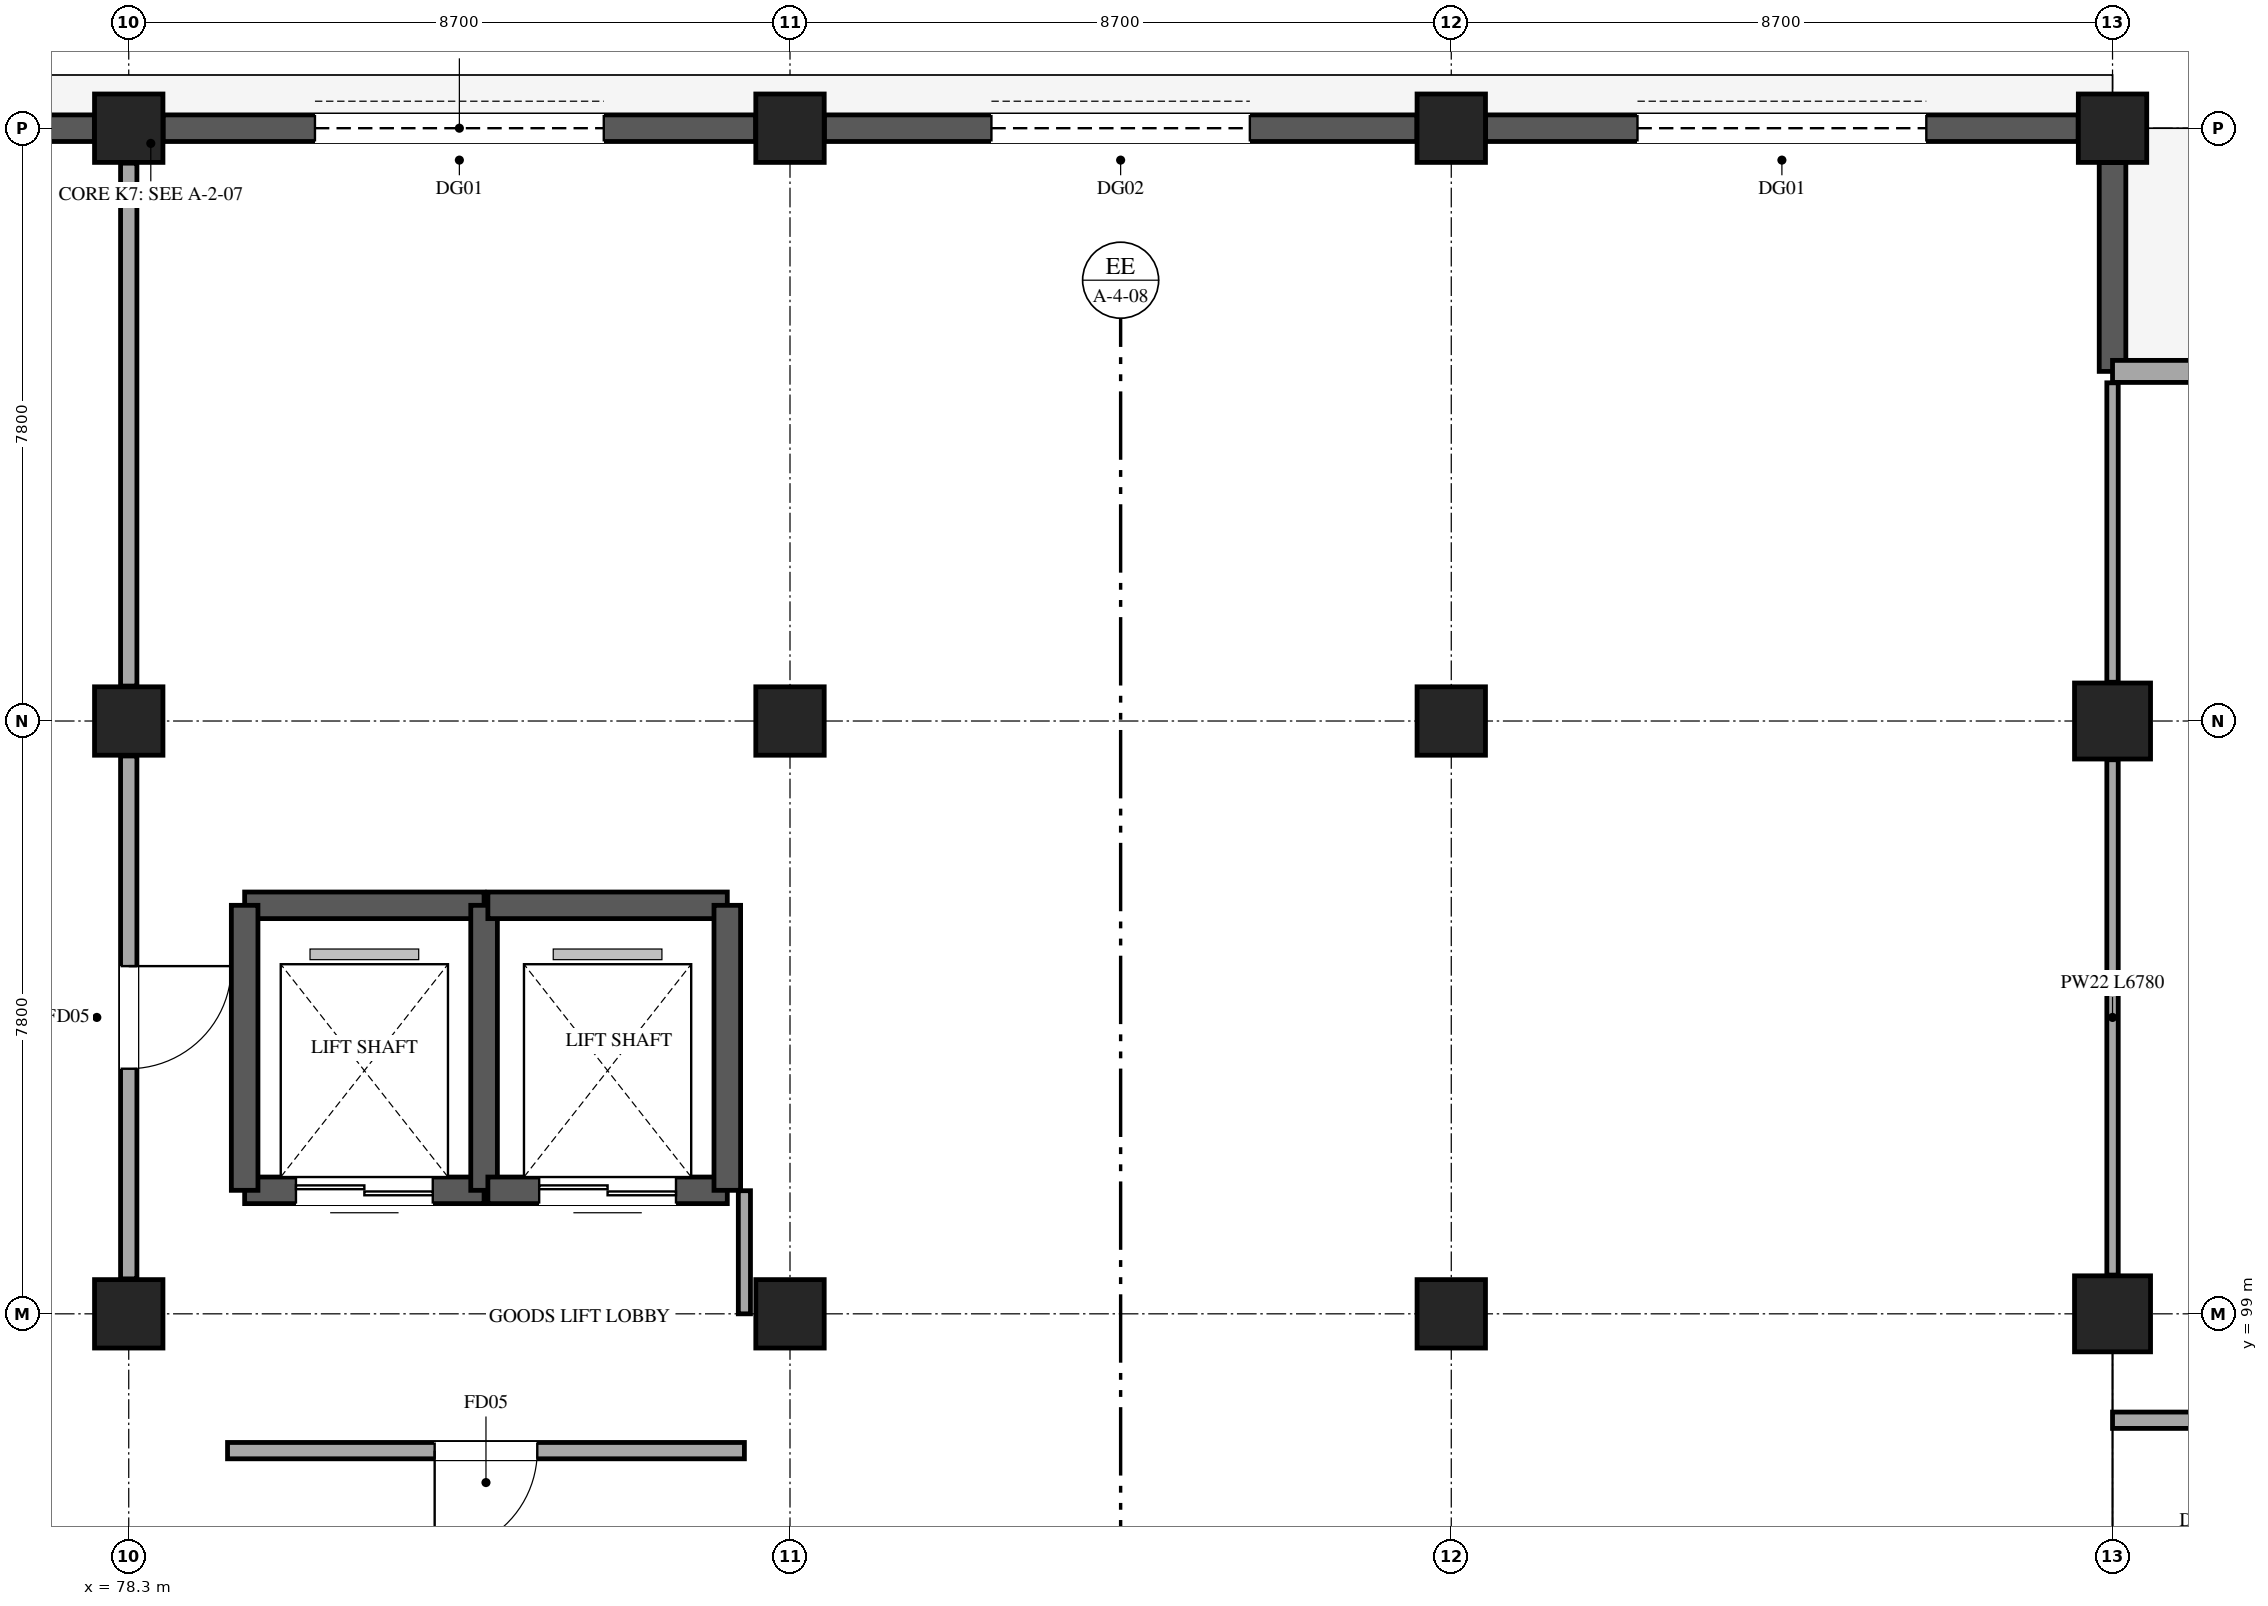
"""IFC4 building model, lengths in metres.
Left out: names, types, materials, properties, quantities, classifications, styles, units other than length and angle.
Written with IfcOpenShell. Run it as: python <this file> out.ifc"""

import sys

from ifc_helpers import new_model, si_unit, direction, frame, frame_2d, origin, origin_2d, place, context, subcontext, project, spatial, rectangle, extrude, element, fill, save


model = new_model("IFC4")
c1 = context("Model", 3, precision=1e-05, world=origin(), true_north=direction((0.0, 1.0)))
c2 = subcontext(c1, "Body", "Model", "MODEL_VIEW")
j1 = project(units=[si_unit("LENGTHUNIT", "METRE"), si_unit("PLANEANGLEUNIT", "RADIAN")], contexts=[c1])
p1 = place(None, origin())
s1 = spatial("IfcSite", under=j1, at=p1, CompositionType="ELEMENT")
p2 = place(p1, origin())
s2 = spatial("IfcBuilding", under=s1, at=p2, CompositionType="ELEMENT")
p3 = place(p2, origin())
s3 = spatial("IfcBuildingStorey", under=s2, at=p3, CompositionType="ELEMENT", Elevation=0.0)
for number, where, z_axis, x_axis in (
    (1, (78.3, 99.0, 0.0), (0.0, 0.0, 1.0), (1.0, 0.0, 0.0)),
    (2, (78.3, 106.8, 0.0), (0.0, 0.0, 1.0), (1.0, 0.0, 0.0)),
    (3, (78.3, 114.6, 0.0), (0.0, 0.0, 1.0), (1.0, 0.0, 0.0)),
    (4, (87.0, 99.0, 0.0), (0.0, 0.0, 1.0), (1.0, 0.0, 0.0)),
    (5, (87.0, 106.8, 0.0), (0.0, 0.0, 1.0), (1.0, 0.0, 0.0)),
    (6, (87.0, 114.6, 0.0), (0.0, 0.0, 1.0), (1.0, 0.0, 0.0)),
    (7, (95.7, 99.0, 0.0), (0.0, 0.0, 1.0), (1.0, 0.0, 0.0)),
    (8, (95.7, 106.8, 0.0), (0.0, 0.0, 1.0), (1.0, 0.0, 0.0)),
    (9, (95.7, 114.6, 0.0), (0.0, 0.0, 1.0), (1.0, 0.0, 0.0)),
):
    element("IfcColumn", number, at=place(p3, frame(where, z_axis=z_axis, x_axis=x_axis)), inside=s3, PredefinedType="COLUMN", context=c2, shape_type="SweptSolid", body=[
        extrude(rectangle(XDim=0.9, YDim=0.9, at=origin_2d()), origin(), (0.0, 0.0, 1.0), 6.0),
    ])
for number, where, z_axis, x_axis in (
    (10, (104.4, 99.0, 0.0), (0.0, 0.0, 1.0), (1.0, 0.0, 0.0)),
    (11, (104.4, 106.8, 0.0), (0.0, 0.0, 1.0), (1.0, 0.0, 0.0)),
):
    element("IfcColumn", number, at=place(p3, frame(where, z_axis=z_axis, x_axis=x_axis)), inside=s3, PredefinedType="COLUMN", context=c2, shape_type="SweptSolid", body=[
        extrude(rectangle(XDim=1.0, YDim=1.0, at=origin_2d()), origin(), (0.0, 0.0, 1.0), 6.0),
    ])
p4 = place(p3, frame((104.4, 114.6, 0.0), z_axis=(0.0, 0.0, 1.0), x_axis=(1.0, 0.0, 0.0)))
e12 = element("IfcColumn", 12, at=p4, inside=s3, PredefinedType="COLUMN", context=c2, shape_type="SweptSolid", body=[
    extrude(rectangle(XDim=0.9, YDim=0.9, at=origin_2d()), origin(), (0.0, 0.0, 1.0), 6.0),
])
p5 = place(p3, frame((70.052, 114.6, 0.0), z_axis=(0.0, 0.0, 1.0), x_axis=(1.0, 0.0, 0.0)))
e13 = element("IfcWall", 13, at=p5, inside=s3, PredefinedType="STANDARD", context=c2, shape_type="SweptSolid", body=[
    extrude(rectangle(XDim=7.796, YDim=0.35, at=frame_2d((3.898, 0.0))), origin(), (0.0, 0.0, 1.0), 5.66),
])
p6 = place(p5, frame((1.543, 0.0, 0.0)))
e14 = element("IfcOpeningElement", 14, at=p6, cuts=e13, PredefinedType="OPENING", context=c2, shape_type="SweptSolid", body=[
    extrude(rectangle(XDim=3.2, YDim=2.4, at=frame_2d((1.6, 1.2))), frame((0.0, 0.185, 0.0), z_axis=(0.0, -1.0, 0.0), x_axis=(1.0, 0.0, 0.0)), (0.0, 0.0, 1.0), 0.37),
])
p7 = place(p3, frame((78.752, 114.6, 0.0), z_axis=(0.0, 0.0, 1.0), x_axis=(1.0, 0.0, 0.0)))
e15 = element("IfcWall", 15, at=p7, inside=s3, PredefinedType="STANDARD", context=c2, shape_type="SweptSolid", body=[
    extrude(rectangle(XDim=7.796, YDim=0.35, at=frame_2d((3.898, 0.0))), origin(), (0.0, 0.0, 1.0), 5.66),
])
p8 = place(p7, frame((1.998, 0.0, 0.0)))
e16 = element("IfcOpeningElement", 16, at=p8, cuts=e15, PredefinedType="OPENING", context=c2, shape_type="SweptSolid", body=[
    extrude(rectangle(XDim=3.8, YDim=4.0, at=frame_2d((1.9, 2.0))), frame((0.0, 0.185, 0.0), z_axis=(0.0, -1.0, 0.0), x_axis=(1.0, 0.0, 0.0)), (0.0, 0.0, 1.0), 0.37),
])
p9 = place(p3, frame((87.452, 114.6, 0.0), z_axis=(0.0, 0.0, 1.0), x_axis=(1.0, 0.0, 0.0)))
e17 = element("IfcWall", 17, at=p9, inside=s3, PredefinedType="STANDARD", context=c2, shape_type="SweptSolid", body=[
    extrude(rectangle(XDim=7.796, YDim=0.35, at=frame_2d((3.898, 0.0))), origin(), (0.0, 0.0, 1.0), 5.66),
])
p10 = place(p9, frame((2.198, 0.0, 0.0)))
e18 = element("IfcOpeningElement", 18, at=p10, cuts=e17, PredefinedType="OPENING", context=c2, shape_type="SweptSolid", body=[
    extrude(rectangle(XDim=3.4, YDim=3.8, at=frame_2d((1.7, 1.9))), frame((0.0, 0.185, 0.0), z_axis=(0.0, -1.0, 0.0), x_axis=(1.0, 0.0, 0.0)), (0.0, 0.0, 1.0), 0.37),
])
p11 = place(p3, frame((96.152, 114.6, 0.0), z_axis=(0.0, 0.0, 1.0), x_axis=(1.0, 0.0, 0.0)))
e19 = element("IfcWall", 19, at=p11, inside=s3, PredefinedType="STANDARD", context=c2, shape_type="SweptSolid", body=[
    extrude(rectangle(XDim=7.796, YDim=0.35, at=frame_2d((3.898, 0.0))), origin(), (0.0, 0.0, 1.0), 5.66),
])
p12 = place(p11, frame((1.998, 0.0, 0.0)))
e20 = element("IfcOpeningElement", 20, at=p12, cuts=e19, PredefinedType="OPENING", context=c2, shape_type="SweptSolid", body=[
    extrude(rectangle(XDim=3.8, YDim=4.0, at=frame_2d((1.9, 2.0))), frame((0.0, 0.185, 0.0), z_axis=(0.0, -1.0, 0.0), x_axis=(1.0, 0.0, 0.0)), (0.0, 0.0, 1.0), 0.37),
])
p13 = place(p3, frame((104.4, 114.148, 0.0), z_axis=(0.0, 0.0, 1.0), x_axis=(0.0, -1.0, 0.0)))
e21 = element("IfcWall", 21, at=p13, inside=s3, PredefinedType="STANDARD", context=c2, shape_type="SweptSolid", body=[
    extrude(rectangle(XDim=2.748, YDim=0.35, at=frame_2d((1.374, 0.0))), origin(), (0.0, 0.0, 1.0), 5.66),
])
p14 = place(p3, frame((104.4, 111.4, 0.0), z_axis=(0.0, 0.0, 1.0), x_axis=(1.0, 0.0, 0.0)))
e22 = element("IfcWall", 22, at=p14, inside=s3, PredefinedType="STANDARD", context=c2, shape_type="SweptSolid", body=[
    extrude(rectangle(XDim=6.665, YDim=0.29, at=frame_2d((3.333, 0.0))), origin(), (0.0, 0.0, 1.0), 4.875),
])
p15 = place(p14, frame((1.932, 0.0, 0.0)))
e23 = element("IfcOpeningElement", 23, at=p15, cuts=e22, PredefinedType="OPENING", context=c2, shape_type="SweptSolid", body=[
    extrude(rectangle(XDim=2.8, YDim=2.5, at=frame_2d((1.4, 1.25))), frame((0.0, 0.155, 0.0), z_axis=(0.0, -1.0, 0.0), x_axis=(1.0, 0.0, 0.0)), (0.0, 0.0, 1.0), 0.31),
])
p16 = place(p3, frame((79.825, 104.375, 0.0), z_axis=(0.0, 0.0, 1.0), x_axis=(1.0, 0.0, 0.0)))
e24 = element("IfcWall", 24, at=p16, inside=s3, PredefinedType="SHEAR", context=c2, shape_type="SweptSolid", body=[
    extrude(rectangle(XDim=3.15, YDim=0.35, at=frame_2d((1.575, 0.0))), origin(), (0.0, 0.0, 1.0), 6.0),
])
p17 = place(p3, frame((82.975, 100.625, 0.0), z_axis=(0.0, 0.0, 1.0), x_axis=(-1.0, 0.0, 0.0)))
e25 = element("IfcWall", 25, at=p17, inside=s3, PredefinedType="SHEAR", context=c2, shape_type="SweptSolid", body=[
    extrude(rectangle(XDim=3.15, YDim=0.35, at=frame_2d((1.575, 0.0))), origin(), (0.0, 0.0, 1.0), 6.0),
])
p18 = place(p17, frame((0.675, 0.0, 0.0)))
e26 = element("IfcOpeningElement", 26, at=p18, cuts=e25, PredefinedType="OPENING", context=c2, shape_type="SweptSolid", body=[
    extrude(rectangle(XDim=1.8, YDim=2.4, at=frame_2d((0.9, 1.2))), frame((0.0, 0.185, 0.0), z_axis=(0.0, -1.0, 0.0), x_axis=(1.0, 0.0, 0.0)), (0.0, 0.0, 1.0), 0.37),
])
for number, where, z_axis, x_axis in (
    (27, (79.825, 100.625, 0.0), (0.0, 0.0, 1.0), (0.0, 1.0, 0.0)),
    (28, (82.975, 104.375, 0.0), (0.0, 0.0, 1.0), (0.0, -1.0, 0.0)),
):
    element("IfcWall", number, at=place(p3, frame(where, z_axis=z_axis, x_axis=x_axis)), inside=s3, PredefinedType="SHEAR", context=c2, shape_type="SweptSolid", body=[
        extrude(rectangle(XDim=3.75, YDim=0.35, at=frame_2d((1.875, 0.0))), origin(), (0.0, 0.0, 1.0), 6.0),
    ])
p19 = place(p3, frame((83.025, 104.375, 0.0), z_axis=(0.0, 0.0, 1.0), x_axis=(1.0, 0.0, 0.0)))
e29 = element("IfcWall", 29, at=p19, inside=s3, PredefinedType="SHEAR", context=c2, shape_type="SweptSolid", body=[
    extrude(rectangle(XDim=3.15, YDim=0.35, at=frame_2d((1.575, 0.0))), origin(), (0.0, 0.0, 1.0), 6.0),
])
p20 = place(p3, frame((86.175, 100.625, 0.0), z_axis=(0.0, 0.0, 1.0), x_axis=(-1.0, 0.0, 0.0)))
e30 = element("IfcWall", 30, at=p20, inside=s3, PredefinedType="SHEAR", context=c2, shape_type="SweptSolid", body=[
    extrude(rectangle(XDim=3.15, YDim=0.35, at=frame_2d((1.575, 0.0))), origin(), (0.0, 0.0, 1.0), 6.0),
])
p21 = place(p20, frame((0.675, 0.0, 0.0)))
e31 = element("IfcOpeningElement", 31, at=p21, cuts=e30, PredefinedType="OPENING", context=c2, shape_type="SweptSolid", body=[
    extrude(rectangle(XDim=1.8, YDim=2.4, at=frame_2d((0.9, 1.2))), frame((0.0, 0.185, 0.0), z_axis=(0.0, -1.0, 0.0), x_axis=(1.0, 0.0, 0.0)), (0.0, 0.0, 1.0), 0.37),
])
p22 = place(p3, frame((86.175, 104.375, 0.0), z_axis=(0.0, 0.0, 1.0), x_axis=(0.0, -1.0, 0.0)))
e32 = element("IfcWall", 32, at=p22, inside=s3, PredefinedType="SHEAR", context=c2, shape_type="SweptSolid", body=[
    extrude(rectangle(XDim=3.75, YDim=0.35, at=frame_2d((1.875, 0.0))), origin(), (0.0, 0.0, 1.0), 6.0),
])
p23 = place(p3, frame((86.4, 97.2, 0.0), z_axis=(0.0, 0.0, 1.0), x_axis=(-1.0, 0.0, 0.0)))
e33 = element("IfcWall", 33, at=p23, inside=s3, PredefinedType="PARTITIONING", context=c2, shape_type="SweptSolid", body=[
    extrude(rectangle(XDim=6.8, YDim=0.215, at=frame_2d((3.4, 0.0))), origin(), (0.0, 0.0, 1.0), 5.66),
])
p24 = place(p23, frame((2.725, 0.0, 0.0)))
e34 = element("IfcOpeningElement", 34, at=p24, cuts=e33, PredefinedType="OPENING", context=c2, shape_type="SweptSolid", body=[
    extrude(rectangle(XDim=1.35, YDim=2.2, at=frame_2d((0.675, 1.1))), frame((0.0, 0.118, 0.0), z_axis=(0.0, -1.0, 0.0), x_axis=(1.0, 0.0, 0.0)), (0.0, 0.0, 1.0), 0.235),
])
p25 = place(p3, frame((86.4, 100.62, 0.0), z_axis=(0.0, 0.0, 1.0), x_axis=(0.0, -1.0, 0.0)))
e35 = element("IfcWall", 35, at=p25, inside=s3, PredefinedType="PARTITIONING", context=c2, shape_type="SweptSolid", body=[
    extrude(rectangle(XDim=1.62, YDim=0.16, at=frame_2d((0.81, 0.0))), origin(), (0.0, 0.0, 1.0), 4.88),
])
p26 = place(p3, frame((78.3, 114.14, 0.0), z_axis=(0.0, 0.0, 1.0), x_axis=(0.0, -1.0, 0.0)))
e36 = element("IfcWall", 36, at=p26, inside=s3, PredefinedType="PARTITIONING", context=c2, shape_type="SweptSolid", body=[
    extrude(rectangle(XDim=6.88, YDim=0.215, at=frame_2d((3.44, 0.0))), origin(), (0.0, 0.0, 1.0), 4.88),
])
p27 = place(p3, frame((78.3, 106.34, 0.0), z_axis=(0.0, 0.0, 1.0), x_axis=(0.0, -1.0, 0.0)))
e37 = element("IfcWall", 37, at=p27, inside=s3, PredefinedType="PARTITIONING", context=c2, shape_type="SweptSolid", body=[
    extrude(rectangle(XDim=6.88, YDim=0.215, at=frame_2d((3.44, 0.0))), origin(), (0.0, 0.0, 1.0), 4.88),
])
p28 = place(p27, frame((2.765, 0.0, 0.0)))
e38 = element("IfcOpeningElement", 38, at=p28, cuts=e37, PredefinedType="OPENING", context=c2, shape_type="SweptSolid", body=[
    extrude(rectangle(XDim=1.35, YDim=2.2, at=frame_2d((0.675, 1.1))), frame((0.0, 0.118, 0.0), z_axis=(0.0, -1.0, 0.0), x_axis=(1.0, 0.0, 0.0)), (0.0, 0.0, 1.0), 0.235),
])
p29 = place(p3, frame((104.4, 97.6, 0.0), z_axis=(0.0, 0.0, 1.0), x_axis=(1.0, 0.0, 0.0)))
e39 = element("IfcWall", 39, at=p29, inside=s3, PredefinedType="PARTITIONING", context=c2, shape_type="SweptSolid", body=[
    extrude(rectangle(XDim=5.5, YDim=0.215, at=frame_2d((2.75, 0.0))), origin(), (0.0, 0.0, 1.0), 4.88),
])
p30 = place(p29, frame((2.075, 0.0, 0.0)))
e40 = element("IfcOpeningElement", 40, at=p30, cuts=e39, PredefinedType="OPENING", context=c2, shape_type="SweptSolid", body=[
    extrude(rectangle(XDim=1.35, YDim=2.2, at=frame_2d((0.675, 1.1))), frame((0.0, 0.118, 0.0), z_axis=(0.0, -1.0, 0.0), x_axis=(1.0, 0.0, 0.0)), (0.0, 0.0, 1.0), 0.235),
])
p31 = place(p3, frame((104.4, 111.25, 0.0), z_axis=(0.0, 0.0, 1.0), x_axis=(0.0, -1.0, 0.0)))
e41 = element("IfcWall", 41, at=p31, inside=s3, PredefinedType="PARTITIONING", context=c2, shape_type="SweptSolid", body=[
    extrude(rectangle(XDim=3.94, YDim=0.15, at=frame_2d((1.97, 0.0))), origin(), (0.0, 0.0, 1.0), 4.88),
])
p32 = place(p3, frame((104.4, 106.29, 0.0), z_axis=(0.0, 0.0, 1.0), x_axis=(0.0, -1.0, 0.0)))
e42 = element("IfcWall", 42, at=p32, inside=s3, PredefinedType="PARTITIONING", context=c2, shape_type="SweptSolid", body=[
    extrude(rectangle(XDim=6.78, YDim=0.15, at=frame_2d((3.39, 0.0))), origin(), (0.0, 0.0, 1.0), 4.88),
])
p33 = place(p8, origin())
e43 = element("IfcDoor", 43, at=p33, inside=s3, OperationType="ROLLINGUP", PredefinedType="GATE", context=c2, shape_type="SweptSolid", body=[
    extrude(rectangle(XDim=3.8, YDim=4.0, at=frame_2d((1.9, 2.0))), frame((0.0, 0.025, 0.0), z_axis=(0.0, -1.0, 0.0), x_axis=(1.0, 0.0, 0.0)), (0.0, 0.0, 1.0), 0.05),
])
fill(e16, e43)
p34 = place(p10, origin())
e44 = element("IfcDoor", 44, at=p34, inside=s3, OperationType="ROLLINGUP", PredefinedType="GATE", context=c2, shape_type="SweptSolid", body=[
    extrude(rectangle(XDim=3.4, YDim=3.8, at=frame_2d((1.7, 1.9))), frame((0.0, 0.025, 0.0), z_axis=(0.0, -1.0, 0.0), x_axis=(1.0, 0.0, 0.0)), (0.0, 0.0, 1.0), 0.05),
])
fill(e18, e44)
p35 = place(p12, origin())
e45 = element("IfcDoor", 45, at=p35, inside=s3, OperationType="ROLLINGUP", PredefinedType="GATE", context=c2, shape_type="SweptSolid", body=[
    extrude(rectangle(XDim=3.8, YDim=4.0, at=frame_2d((1.9, 2.0))), frame((0.0, 0.025, 0.0), z_axis=(0.0, -1.0, 0.0), x_axis=(1.0, 0.0, 0.0)), (0.0, 0.0, 1.0), 0.05),
])
fill(e20, e45)
p36 = place(p18, origin())
e46 = element("IfcDoor", 46, at=p36, inside=s3, OperationType="DOUBLE_DOOR_SLIDING", PredefinedType="DOOR", context=c2, shape_type="SweptSolid", body=[
    extrude(rectangle(XDim=1.8, YDim=2.4, at=frame_2d((0.9, 1.2))), frame((0.0, 0.025, 0.0), z_axis=(0.0, -1.0, 0.0), x_axis=(1.0, 0.0, 0.0)), (0.0, 0.0, 1.0), 0.05),
])
fill(e26, e46)
p37 = place(p21, origin())
e47 = element("IfcDoor", 47, at=p37, inside=s3, OperationType="DOUBLE_DOOR_SLIDING", PredefinedType="DOOR", context=c2, shape_type="SweptSolid", body=[
    extrude(rectangle(XDim=1.8, YDim=2.4, at=frame_2d((0.9, 1.2))), frame((0.0, 0.025, 0.0), z_axis=(0.0, -1.0, 0.0), x_axis=(1.0, 0.0, 0.0)), (0.0, 0.0, 1.0), 0.05),
])
fill(e31, e47)
p38 = place(p24, origin())
e48 = element("IfcDoor", 48, at=p38, inside=s3, OperationType="SINGLE_SWING_RIGHT", PredefinedType="DOOR", context=c2, shape_type="SweptSolid", body=[
    extrude(rectangle(XDim=1.35, YDim=2.2, at=frame_2d((0.675, 1.1))), frame((0.0, 0.025, 0.0), z_axis=(0.0, -1.0, 0.0), x_axis=(1.0, 0.0, 0.0)), (0.0, 0.0, 1.0), 0.05),
])
fill(e34, e48)
p39 = place(p28, origin())
e49 = element("IfcDoor", 49, at=p39, inside=s3, OperationType="SINGLE_SWING_LEFT", PredefinedType="DOOR", context=c2, shape_type="SweptSolid", body=[
    extrude(rectangle(XDim=1.35, YDim=2.2, at=frame_2d((0.675, 1.1))), frame((0.0, 0.025, 0.0), z_axis=(0.0, -1.0, 0.0), x_axis=(1.0, 0.0, 0.0)), (0.0, 0.0, 1.0), 0.05),
])
fill(e38, e49)
save(model, sys.argv[1])
